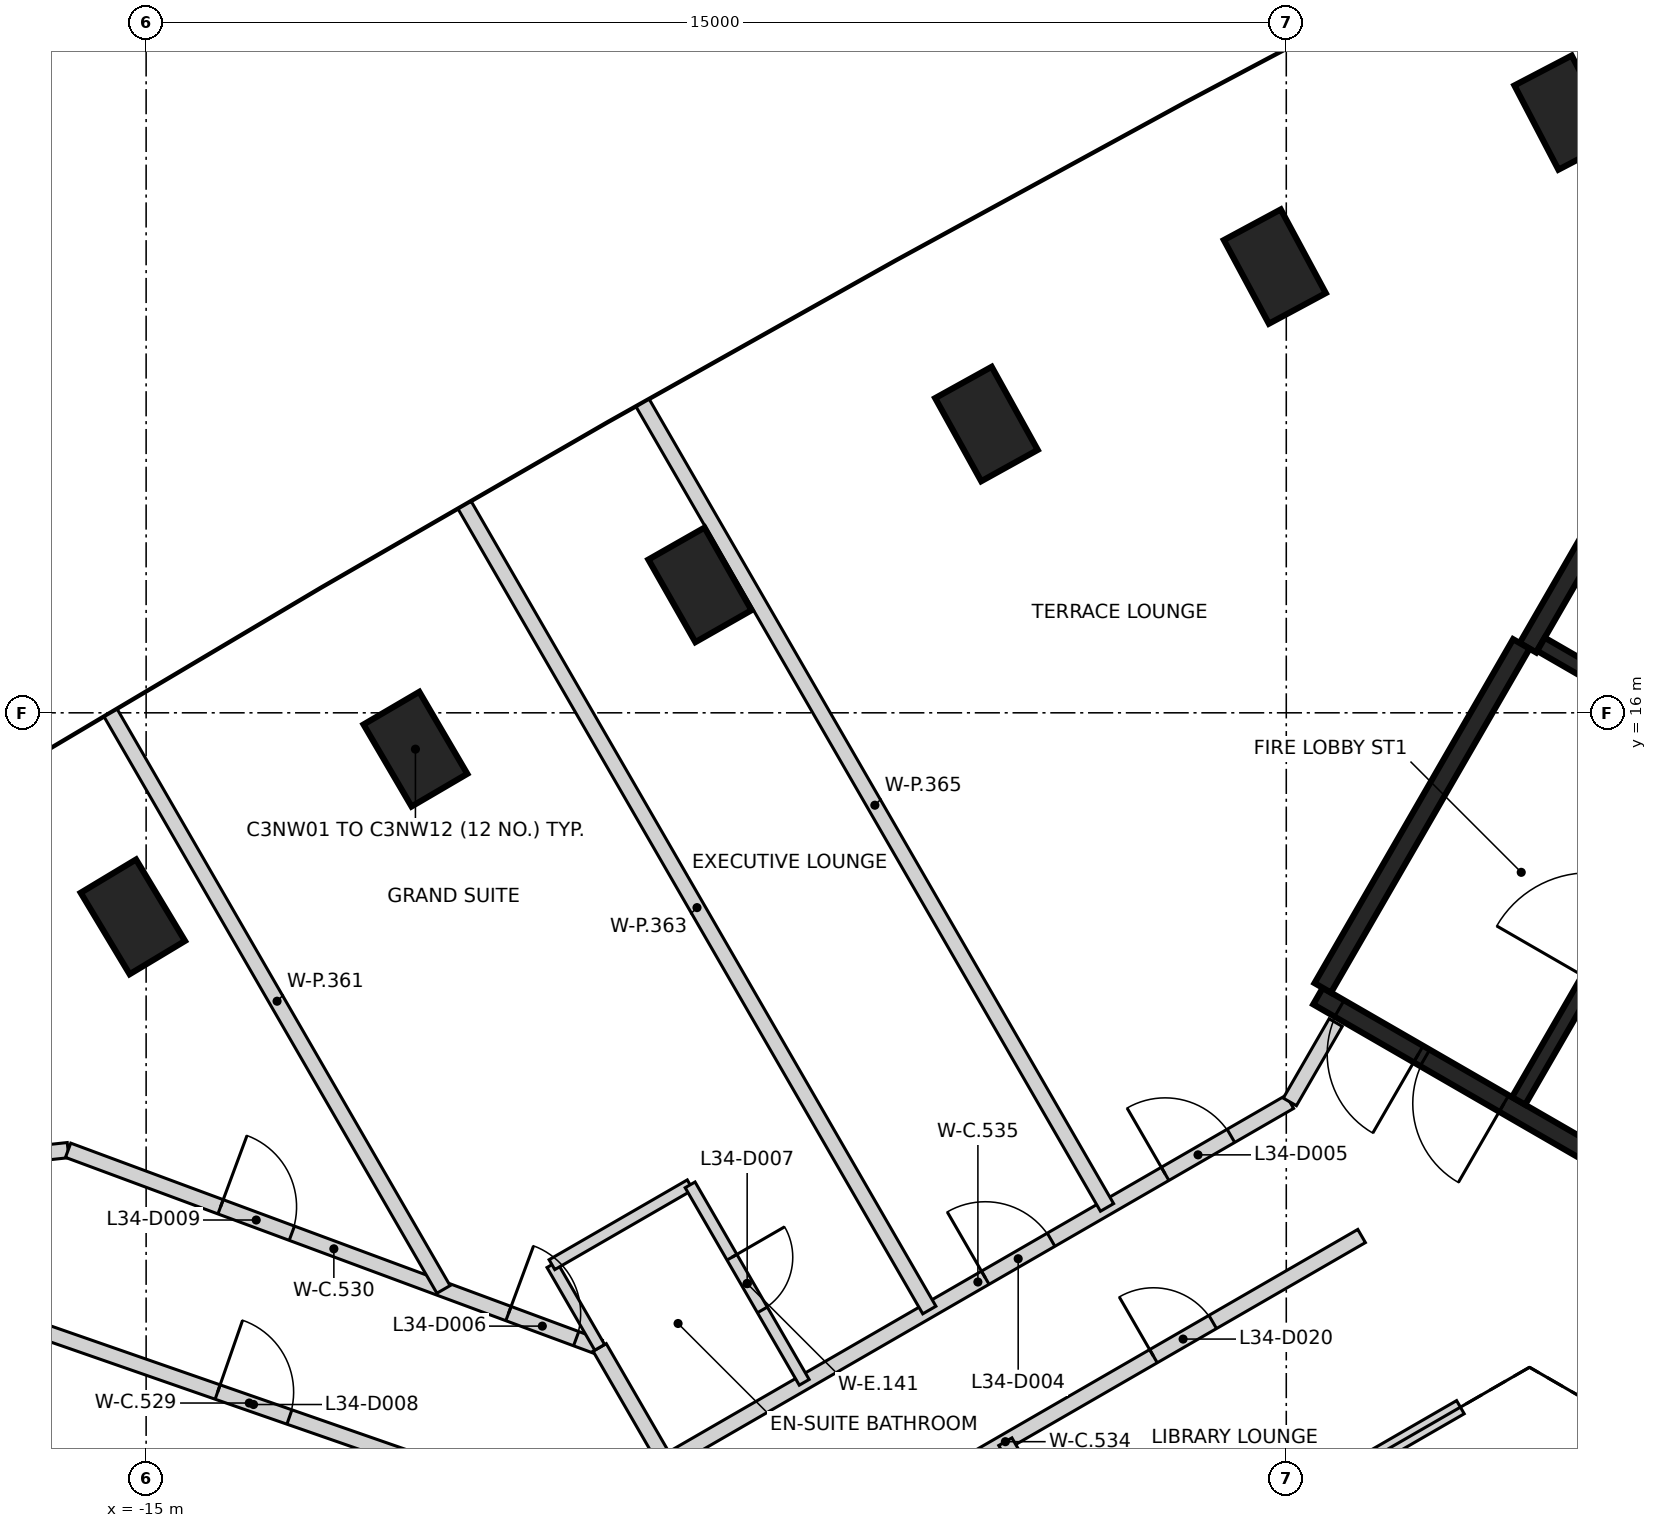
"""IFC4 building model, lengths in metres.
Left out: names, types, materials, properties, quantities, classifications, styles, units other than length and angle.
Written with IfcOpenShell. Run it as: python <this file> out.ifc"""

import sys

from ifc_helpers import new_model, si_unit, direction, frame, frame_2d, origin, origin_2d, place, context, subcontext, project, spatial, rectangle, extrude, element, fill, save


model = new_model("IFC4")
c1 = context("Model", 3, precision=1e-05, world=origin(), true_north=direction((0.0, 1.0)))
c2 = subcontext(c1, "Body", "Model", "MODEL_VIEW")
j1 = project(units=[si_unit("LENGTHUNIT", "METRE"), si_unit("PLANEANGLEUNIT", "RADIAN")], contexts=[c1])
p1 = place(None, origin())
s1 = spatial("IfcSite", under=j1, at=p1, CompositionType="ELEMENT")
p2 = place(p1, origin())
s2 = spatial("IfcBuilding", under=s1, at=p2, CompositionType="ELEMENT")
p3 = place(p2, frame((0.0, 0.0, 139.6)))
s3 = spatial("IfcBuildingStorey", under=s2, at=p3, CompositionType="ELEMENT", Elevation=139.6)
for number, where, z_axis, x_axis in (
    (1, (3.667, 23.896, -0.4), (0.0, 0.0, 1.0), (-0.463, 0.886, 0.0)),
    (2, (-0.151, 21.871, -0.4), (0.0, 0.0, 1.0), (-0.474, 0.881, 0.0)),
    (3, (-3.945, 19.8, -0.4), (0.0, 0.0, 1.0), (-0.485, 0.875, 0.0)),
    (4, (-7.714, 17.683, -0.4), (0.0, 0.0, 1.0), (-0.495, 0.869, 0.0)),
    (5, (-11.457, 15.522, -0.4), (0.0, 0.0, 1.0), (-0.505, 0.863, 0.0)),
    (6, (-15.175, 13.316, -0.4), (0.0, 0.0, 1.0), (-0.515, 0.857, 0.0)),
):
    element("IfcColumn", number, at=place(p3, frame(where, z_axis=z_axis, x_axis=x_axis)), inside=s3, PredefinedType="COLUMN", context=c2, shape_type="SweptSolid", body=[
        extrude(rectangle(XDim=1.25, YDim=0.85, at=origin_2d()), origin(), (0.0, 0.0, 1.0), 3.6),
    ])
p4 = place(p3, frame((10.42, 6.498, 0.0), z_axis=(0.0, 0.0, 1.0), x_axis=(-0.866021906294, 0.500006057782, 0.0)))
e7 = element("IfcWall", 7, at=p4, inside=s3, PredefinedType="SHEAR", context=c2, shape_type="SweptSolid", body=[
    extrude(rectangle(XDim=11.55, YDim=0.25, at=frame_2d((5.775, 0.0))), origin(), (0.0, 0.0, 1.0), 3.2),
])
p5 = place(p4, frame((10.025, 0.0, 0.0)))
e8 = element("IfcOpeningElement", 8, at=p5, cuts=e7, PredefinedType="OPENING", context=c2, shape_type="SweptSolid", body=[
    extrude(rectangle(XDim=1.2, YDim=2.1, at=frame_2d((0.6, 1.05))), frame((0.0, 0.135, 0.0), z_axis=(0.0, -1.0, 0.0), x_axis=(1.0, 0.0, 0.0)), (0.0, 0.0, 1.0), 0.27),
])
p6 = place(p4, frame((8.725, 0.0, 0.0)))
e9 = element("IfcOpeningElement", 9, at=p6, cuts=e7, PredefinedType="OPENING", context=c2, shape_type="SweptSolid", body=[
    extrude(rectangle(XDim=1.2, YDim=2.1, at=frame_2d((0.6, 1.05))), frame((0.0, 0.135, 0.0), z_axis=(0.0, -1.0, 0.0), x_axis=(1.0, 0.0, 0.0)), (0.0, 0.0, 1.0), 0.27),
])
p7 = place(p3, frame((3.179, 16.856, 0.0), z_axis=(0.0, 0.0, 1.0), x_axis=(0.500004234368, 0.866022959057, 0.0)))
e10 = element("IfcWall", 10, at=p7, inside=s3, PredefinedType="SHEAR", context=c2, shape_type="SweptSolid", body=[
    extrude(rectangle(XDim=6.25, YDim=0.25, at=frame_2d((3.125, 0.0))), origin(), (0.0, 0.0, 1.0), 3.2),
])
p8 = place(p3, frame((0.48, 12.381, 0.0), z_axis=(0.0, 0.0, 1.0), x_axis=(0.49999885962, 0.866026062182, 0.0)))
e11 = element("IfcWall", 11, at=p8, inside=s3, PredefinedType="SHEAR", context=c2, shape_type="SweptSolid", body=[
    extrude(rectangle(XDim=5.225, YDim=0.25, at=frame_2d((2.612, 0.0))), origin(), (0.0, 0.0, 1.0), 3.2),
])
p9 = place(p3, frame((3.057, 10.895, 0.0), z_axis=(0.0, 0.0, 1.0), x_axis=(0.499989418164, 0.866031513124, 0.0)))
e12 = element("IfcWall", 12, at=p9, inside=s3, PredefinedType="SHEAR", context=c2, shape_type="SweptSolid", body=[
    extrude(rectangle(XDim=5.251, YDim=0.2, at=frame_2d((2.625, 0.0))), origin(), (0.0, 0.0, 1.0), 3.2),
])
p10 = place(p9, frame((1.849, 0.0, 0.0)))
e13 = element("IfcOpeningElement", 13, at=p10, cuts=e12, PredefinedType="OPENING", context=c2, shape_type="SweptSolid", body=[
    extrude(rectangle(XDim=1.4, YDim=2.1, at=frame_2d((0.7, 1.05))), frame((0.0, 0.11, 0.0), z_axis=(0.0, -1.0, 0.0), x_axis=(1.0, 0.0, 0.0)), (0.0, 0.0, 1.0), 0.22),
])
p11 = place(p3, frame((5.725, 15.531, 0.0), z_axis=(0.0, 0.0, 1.0), x_axis=(-0.866037306777, 0.499979382845, 0.0)))
e14 = element("IfcWall", 14, at=p11, inside=s3, PredefinedType="SHEAR", context=c2, shape_type="SweptSolid", body=[
    extrude(rectangle(XDim=2.742, YDim=0.2, at=frame_2d((1.371, 0.0))), origin(), (0.0, 0.0, 1.0), 3.2),
])
p12 = place(p11, frame((0.743, 0.0, 0.0)))
e15 = element("IfcOpeningElement", 15, at=p12, cuts=e14, PredefinedType="OPENING", context=c2, shape_type="SweptSolid", body=[
    extrude(rectangle(XDim=1.3, YDim=2.1, at=frame_2d((0.65, 1.05))), frame((0.0, 0.11, 0.0), z_axis=(0.0, -1.0, 0.0), x_axis=(1.0, 0.0, 0.0)), (0.0, 0.0, 1.0), 0.22),
])
p13 = place(p3, frame((-18.865, 9.941, 0.0), z_axis=(0.0, 0.0, 1.0), x_axis=(0.99423123086, 0.107257911519, 0.0)))
e16 = element("IfcWall", 16, at=p13, inside=s3, PredefinedType="PARTITIONING", context=c2, shape_type="SweptSolid", body=[
    extrude(rectangle(XDim=2.854, YDim=0.2, at=frame_2d((1.427, 0.0))), origin(), (0.0, 0.0, 1.0), 3.2),
])
p14 = place(p3, frame((-16.402, 7.879, 0.0), z_axis=(0.0, 0.0, 1.0), x_axis=(0.94449961557, -0.328512520596, 0.0)))
e17 = element("IfcWall", 17, at=p14, inside=s3, PredefinedType="PARTITIONING", context=c2, shape_type="SweptSolid", body=[
    extrude(rectangle(XDim=5.842, YDim=0.2, at=frame_2d((2.921, 0.0))), origin(), (0.0, 0.0, 1.0), 3.2),
])
p15 = place(p14, frame((2.481, 0.0, 0.0)))
e18 = element("IfcOpeningElement", 18, at=p15, cuts=e17, PredefinedType="OPENING", context=c2, shape_type="SweptSolid", body=[
    extrude(rectangle(XDim=1.0, YDim=2.1, at=frame_2d((0.5, 1.05))), frame((0.0, 0.11, 0.0), z_axis=(0.0, -1.0, 0.0), x_axis=(1.0, 0.0, 0.0)), (0.0, 0.0, 1.0), 0.22),
])
p16 = place(p3, frame((-16.026, 10.245, 0.0), z_axis=(0.0, 0.0, 1.0), x_axis=(0.937607706988, -0.347694963721, 0.0)))
e19 = element("IfcWall", 19, at=p16, inside=s3, PredefinedType="PARTITIONING", context=c2, shape_type="SweptSolid", body=[
    extrude(rectangle(XDim=7.458, YDim=0.2, at=frame_2d((3.729, 0.0))), origin(), (0.0, 0.0, 1.0), 3.2),
])
p17 = place(p16, frame((6.179, 0.0, 0.0)))
e20 = element("IfcOpeningElement", 20, at=p17, cuts=e19, PredefinedType="OPENING", context=c2, shape_type="SweptSolid", body=[
    extrude(rectangle(XDim=0.95, YDim=2.1, at=frame_2d((0.475, 1.05))), frame((0.0, 0.11, 0.0), z_axis=(0.0, -1.0, 0.0), x_axis=(1.0, 0.0, 0.0)), (0.0, 0.0, 1.0), 0.22),
])
p18 = place(p16, frame((2.139, 0.0, 0.0)))
e21 = element("IfcOpeningElement", 21, at=p18, cuts=e19, PredefinedType="OPENING", context=c2, shape_type="SweptSolid", body=[
    extrude(rectangle(XDim=1.0, YDim=2.1, at=frame_2d((0.5, 1.05))), frame((0.0, 0.11, 0.0), z_axis=(0.0, -1.0, 0.0), x_axis=(1.0, 0.0, 0.0)), (0.0, 0.0, 1.0), 0.22),
])
p19 = place(p3, frame((-9.033, 7.651, 0.0), z_axis=(0.0, 0.0, 1.0), x_axis=(0.500417633986, -0.865784148386, 0.0)))
e22 = element("IfcWall", 22, at=p19, inside=s3, PredefinedType="PARTITIONING", context=c2, shape_type="SweptSolid", body=[
    extrude(rectangle(XDim=1.743, YDim=0.2, at=frame_2d((0.871, 0.0))), origin(), (0.0, 0.0, 1.0), 3.2),
])
p20 = place(p3, frame((-8.382, 3.705, 0.0), z_axis=(0.0, 0.0, 1.0), x_axis=(0.866012036978, 0.500023151273, 0.0)))
e23 = element("IfcWall", 23, at=p20, inside=s3, PredefinedType="PARTITIONING", context=c2, shape_type="SweptSolid", body=[
    extrude(rectangle(XDim=10.823, YDim=0.2, at=frame_2d((5.412, 0.0))), origin(), (0.0, 0.0, 1.0), 3.2),
])
p21 = place(p20, frame((7.661, 0.0, 0.0)))
e24 = element("IfcOpeningElement", 24, at=p21, cuts=e23, PredefinedType="OPENING", context=c2, shape_type="SweptSolid", body=[
    extrude(rectangle(XDim=0.9, YDim=2.1, at=frame_2d((0.45, 1.05))), frame((0.0, 0.11, 0.0), z_axis=(0.0, -1.0, 0.0), x_axis=(1.0, 0.0, 0.0)), (0.0, 0.0, 1.0), 0.22),
])
p22 = place(p20, frame((2.261, 0.0, 0.0)))
e25 = element("IfcOpeningElement", 25, at=p22, cuts=e23, PredefinedType="OPENING", context=c2, shape_type="SweptSolid", body=[
    extrude(rectangle(XDim=0.9, YDim=2.1, at=frame_2d((0.45, 1.05))), frame((0.0, 0.11, 0.0), z_axis=(0.0, -1.0, 0.0), x_axis=(1.0, 0.0, 0.0)), (0.0, 0.0, 1.0), 0.22),
])
p23 = place(p3, frame((-8.161, 6.142, 0.0), z_axis=(0.0, 0.0, 1.0), x_axis=(0.865927304867, 0.500169873828, 0.0)))
e26 = element("IfcWall", 26, at=p23, inside=s3, PredefinedType="PARTITIONING", context=c2, shape_type="SweptSolid", body=[
    extrude(rectangle(XDim=9.478, YDim=0.2, at=frame_2d((4.739, 0.0))), origin(), (0.0, 0.0, 1.0), 3.2),
])
p24 = place(p23, frame((4.851, 0.0, 0.0)))
e27 = element("IfcOpeningElement", 27, at=p24, cuts=e26, PredefinedType="OPENING", context=c2, shape_type="SweptSolid", body=[
    extrude(rectangle(XDim=1.0, YDim=2.1, at=frame_2d((0.5, 1.05))), frame((0.0, 0.11, 0.0), z_axis=(0.0, -1.0, 0.0), x_axis=(1.0, 0.0, 0.0)), (0.0, 0.0, 1.0), 0.22),
])
p25 = place(p23, frame((7.583, 0.0, 0.0)))
e28 = element("IfcOpeningElement", 28, at=p25, cuts=e26, PredefinedType="OPENING", context=c2, shape_type="SweptSolid", body=[
    extrude(rectangle(XDim=1.0, YDim=2.1, at=frame_2d((0.5, 1.05))), frame((0.0, 0.11, 0.0), z_axis=(0.0, -1.0, 0.0), x_axis=(1.0, 0.0, 0.0)), (0.0, 0.0, 1.0), 0.22),
])
p26 = place(p3, frame((0.047, 10.881, 0.0), z_axis=(0.0, 0.0, 1.0), x_axis=(0.500038011057, 0.866003456978, 0.0)))
e29 = element("IfcWall", 29, at=p26, inside=s3, PredefinedType="PARTITIONING", context=c2, shape_type="SweptSolid", body=[
    extrude(rectangle(XDim=1.206, YDim=0.2, at=frame_2d((0.603, 0.0))), origin(), (0.0, 0.0, 1.0), 3.2),
])
p27 = place(p3, frame((-15.467, 15.998, 0.0), z_axis=(0.0, 0.0, 1.0), x_axis=(0.500003998589, -0.866023095186, 0.0)))
e30 = element("IfcWall", 30, at=p27, inside=s3, PredefinedType="PARTITIONING", context=c2, shape_type="SweptSolid", body=[
    extrude(rectangle(XDim=8.757, YDim=0.2, at=frame_2d((4.379, 0.0))), origin(), (0.0, 0.0, 1.0), 2.3),
])
p28 = place(p3, frame((-10.809, 18.731, 0.0), z_axis=(0.0, 0.0, 1.0), x_axis=(0.500004774777, -0.866022647048, 0.0)))
e31 = element("IfcWall", 31, at=p28, inside=s3, PredefinedType="PARTITIONING", context=c2, shape_type="SweptSolid", body=[
    extrude(rectangle(XDim=12.227, YDim=0.2, at=frame_2d((6.113, 0.0))), origin(), (0.0, 0.0, 1.0), 2.3),
])
p29 = place(p3, frame((-8.468, 20.076, 0.0), z_axis=(0.0, 0.0, 1.0), x_axis=(0.499961688474, -0.866047521824, 0.0)))
e32 = element("IfcWall", 32, at=p29, inside=s3, PredefinedType="PARTITIONING", context=c2, shape_type="SweptSolid", body=[
    extrude(rectangle(XDim=12.22, YDim=0.2, at=frame_2d((6.11, 0.0))), origin(), (0.0, 0.0, 1.0), 2.3),
])
p30 = place(p3, frame((-7.082, 1.453, 0.0), z_axis=(0.0, 0.0, 1.0), x_axis=(0.866010525116, 0.500025769724, 0.0)))
e33 = element("IfcWall", 33, at=p30, inside=s3, PredefinedType="PARTITIONING", context=c2, shape_type="SweptSolid", body=[
    extrude(rectangle(XDim=10.823, YDim=0.2, at=frame_2d((5.411, 0.0))), origin(), (0.0, 0.0, 1.0), 2.3),
])
p31 = place(p3, frame((-3.696, 6.411, 0.0), z_axis=(0.0, 0.0, 1.0), x_axis=(0.500006934395, -0.866021400173, 0.0)))
e34 = element("IfcWall", 34, at=p31, inside=s3, PredefinedType="PARTITIONING", context=c2, shape_type="SweptSolid", body=[
    extrude(rectangle(XDim=2.6, YDim=0.2, at=frame_2d((1.3, 0.0))), origin(), (0.0, 0.0, 1.0), 2.3),
])
p32 = place(p3, frame((-9.661, 8.74, 0.0), z_axis=(0.0, 0.0, 1.0), x_axis=(0.49990192124, -0.866082022179, 0.0)))
e35 = element("IfcWall", 35, at=p32, inside=s3, PredefinedType="PARTITIONING", context=c2, shape_type="SweptSolid", body=[
    extrude(rectangle(XDim=1.256, YDim=0.15, at=frame_2d((0.628, 0.0))), origin(), (0.0, 0.0, 1.0), 3.2),
])
p33 = place(p3, frame((-9.661, 8.74, 0.0), z_axis=(0.0, 0.0, 1.0), x_axis=(0.865922159541, 0.500178781653, 0.0)))
e36 = element("IfcWall", 36, at=p33, inside=s3, PredefinedType="PARTITIONING", context=c2, shape_type="SweptSolid", body=[
    extrude(rectangle(XDim=2.099, YDim=0.15, at=frame_2d((1.05, 0.0))), origin(), (0.0, 0.0, 1.0), 3.2),
])
p34 = place(p3, frame((-7.843, 9.79, 0.0), z_axis=(0.0, 0.0, 1.0), x_axis=(0.500234218456, -0.865890135459, 0.0)))
e37 = element("IfcWall", 37, at=p34, inside=s3, PredefinedType="PARTITIONING", context=c2, shape_type="SweptSolid", body=[
    extrude(rectangle(XDim=3.0, YDim=0.15, at=frame_2d((1.5, 0.0))), origin(), (0.0, 0.0, 1.0), 3.2),
])
p35 = place(p34, frame((1.1, 0.0, 0.0)))
e38 = element("IfcOpeningElement", 38, at=p35, cuts=e37, PredefinedType="OPENING", context=c2, shape_type="SweptSolid", body=[
    extrude(rectangle(XDim=0.8, YDim=2.1, at=frame_2d((0.4, 1.05))), frame((0.0, 0.085, 0.0), z_axis=(0.0, -1.0, 0.0), x_axis=(1.0, 0.0, 0.0)), (0.0, 0.0, 1.0), 0.17),
])
p36 = place(p5, origin())
e39 = element("IfcDoor", 39, at=p36, inside=s3, OperationType="SINGLE_SWING_LEFT", PredefinedType="DOOR", context=c2, shape_type="SweptSolid", body=[
    extrude(rectangle(XDim=1.2, YDim=2.1, at=frame_2d((0.6, 1.05))), frame((0.0, 0.025, 0.0), z_axis=(0.0, -1.0, 0.0), x_axis=(1.0, 0.0, 0.0)), (0.0, 0.0, 1.0), 0.05),
])
fill(e8, e39)
p37 = place(p6, origin())
e40 = element("IfcDoor", 40, at=p37, inside=s3, OperationType="SINGLE_SWING_RIGHT", PredefinedType="DOOR", context=c2, shape_type="SweptSolid", body=[
    extrude(rectangle(XDim=1.2, YDim=2.1, at=frame_2d((0.6, 1.05))), frame((0.0, 0.025, 0.0), z_axis=(0.0, -1.0, 0.0), x_axis=(1.0, 0.0, 0.0)), (0.0, 0.0, 1.0), 0.05),
])
fill(e9, e40)
p38 = place(p24, origin())
e41 = element("IfcDoor", 41, at=p38, inside=s3, OperationType="SINGLE_SWING_LEFT", PredefinedType="DOOR", context=c2, shape_type="SweptSolid", body=[
    extrude(rectangle(XDim=1.0, YDim=2.1, at=frame_2d((0.5, 1.05))), frame((0.0, 0.025, 0.0), z_axis=(0.0, -1.0, 0.0), x_axis=(1.0, 0.0, 0.0)), (0.0, 0.0, 1.0), 0.05),
])
fill(e27, e41)
p39 = place(p25, origin())
e42 = element("IfcDoor", 42, at=p39, inside=s3, OperationType="SINGLE_SWING_LEFT", PredefinedType="DOOR", context=c2, shape_type="SweptSolid", body=[
    extrude(rectangle(XDim=1.0, YDim=2.1, at=frame_2d((0.5, 1.05))), frame((0.0, 0.025, 0.0), z_axis=(0.0, -1.0, 0.0), x_axis=(1.0, 0.0, 0.0)), (0.0, 0.0, 1.0), 0.05),
])
fill(e28, e42)
p40 = place(p17, origin())
e43 = element("IfcDoor", 43, at=p40, inside=s3, OperationType="SINGLE_SWING_LEFT", PredefinedType="DOOR", context=c2, shape_type="SweptSolid", body=[
    extrude(rectangle(XDim=0.95, YDim=2.1, at=frame_2d((0.475, 1.05))), frame((0.0, 0.025, 0.0), z_axis=(0.0, -1.0, 0.0), x_axis=(1.0, 0.0, 0.0)), (0.0, 0.0, 1.0), 0.05),
])
fill(e20, e43)
p41 = place(p35, frame((0.8, 0.0, 0.0), z_axis=(0.0, 0.0, 1.0), x_axis=(-1.0, 0.0, 0.0)))
e44 = element("IfcDoor", 44, at=p41, inside=s3, OperationType="SINGLE_SWING_LEFT", PredefinedType="DOOR", context=c2, shape_type="SweptSolid", body=[
    extrude(rectangle(XDim=0.8, YDim=2.1, at=frame_2d((0.4, 1.05))), frame((0.0, 0.025, 0.0), z_axis=(0.0, -1.0, 0.0), x_axis=(1.0, 0.0, 0.0)), (0.0, 0.0, 1.0), 0.05),
])
fill(e38, e44)
p42 = place(p15, frame((1.0, 0.0, 0.0), z_axis=(0.0, 0.0, 1.0), x_axis=(-1.0, 0.0, 0.0)))
e45 = element("IfcDoor", 45, at=p42, inside=s3, OperationType="SINGLE_SWING_LEFT", PredefinedType="DOOR", context=c2, shape_type="SweptSolid", body=[
    extrude(rectangle(XDim=1.0, YDim=2.1, at=frame_2d((0.5, 1.05))), frame((0.0, 0.025, 0.0), z_axis=(0.0, -1.0, 0.0), x_axis=(1.0, 0.0, 0.0)), (0.0, 0.0, 1.0), 0.05),
])
fill(e18, e45)
p43 = place(p18, frame((1.0, 0.0, 0.0), z_axis=(0.0, 0.0, 1.0), x_axis=(-1.0, 0.0, 0.0)))
e46 = element("IfcDoor", 46, at=p43, inside=s3, OperationType="SINGLE_SWING_LEFT", PredefinedType="DOOR", context=c2, shape_type="SweptSolid", body=[
    extrude(rectangle(XDim=1.0, YDim=2.1, at=frame_2d((0.5, 1.05))), frame((0.0, 0.025, 0.0), z_axis=(0.0, -1.0, 0.0), x_axis=(1.0, 0.0, 0.0)), (0.0, 0.0, 1.0), 0.05),
])
fill(e21, e46)
p44 = place(p21, frame((0.9, 0.0, 0.0), z_axis=(0.0, 0.0, 1.0), x_axis=(-1.0, 0.0, 0.0)))
e47 = element("IfcDoor", 47, at=p44, inside=s3, OperationType="SINGLE_SWING_LEFT", PredefinedType="DOOR", context=c2, shape_type="SweptSolid", body=[
    extrude(rectangle(XDim=0.9, YDim=2.1, at=frame_2d((0.45, 1.05))), frame((0.0, 0.025, 0.0), z_axis=(0.0, -1.0, 0.0), x_axis=(1.0, 0.0, 0.0)), (0.0, 0.0, 1.0), 0.05),
])
fill(e24, e47)
save(model, sys.argv[1])
